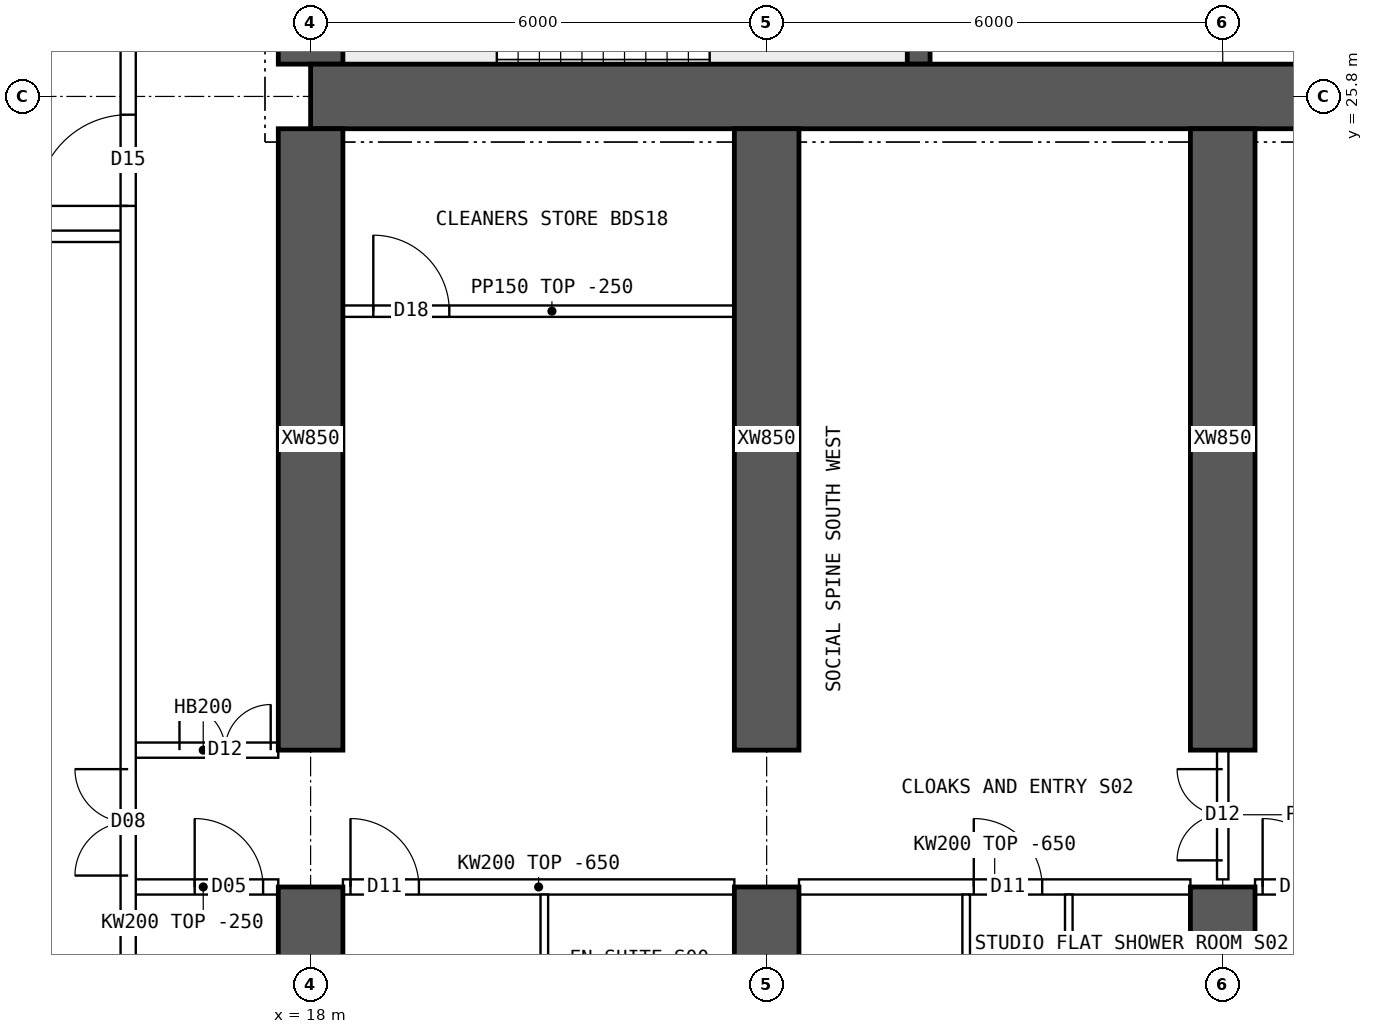
"""IFC4 building model, lengths in metres.
Left out: names, types, materials, properties, quantities, classifications, styles, units other than length and angle.
Written with IfcOpenShell. Run it as: python <this file> out.ifc"""

import sys

from ifc_helpers import new_model, si_unit, direction, frame, frame_2d, origin, place, context, subcontext, project, spatial, polyline, rectangle, outline, extrude, element, fill, save


model = new_model("IFC4")
c1 = context("Model", 3, precision=1e-05, world=origin(), true_north=direction((0.0, 1.0)))
c2 = subcontext(c1, "Body", "Model", "MODEL_VIEW")
j1 = project(units=[si_unit("LENGTHUNIT", "METRE"), si_unit("PLANEANGLEUNIT", "RADIAN")], contexts=[c1])
p1 = place(None, origin())
s1 = spatial("IfcSite", under=j1, at=p1, CompositionType="ELEMENT")
p2 = place(p1, origin())
s2 = spatial("IfcBuilding", under=s1, at=p2, CompositionType="ELEMENT")
p3 = place(p2, frame((0.0, 0.0, 171.1)))
s3 = spatial("IfcBuildingStorey", under=s2, at=p3, CompositionType="ELEMENT", Elevation=171.1)
p4 = place(p3, frame((18.0, 25.8, 0.0), z_axis=(0.0, 0.0, 1.0), x_axis=(1.0, 0.0, 0.0)))
e1 = element("IfcWall", 1, at=p4, inside=s3, PredefinedType="SHEAR", context=c2, shape_type="SweptSolid", body=[
    extrude(rectangle(XDim=48.0, YDim=0.85, at=frame_2d((24.0, 0.0))), origin(), (0.0, 0.0, 1.0), 3.75),
])
p5 = place(p3, frame((18.0, 26.225, 0.0), z_axis=(0.0, 0.0, 1.0), x_axis=(0.0, 1.0, 0.0)))
e2 = element("IfcWall", 2, at=p5, inside=s3, PredefinedType="SHEAR", context=c2, shape_type="SweptSolid", body=[
    extrude(rectangle(XDim=11.55, YDim=0.85, at=frame_2d((5.775, 0.0))), origin(), (0.0, 0.0, 1.0), 3.75),
])
p6 = place(p5, frame((5.075, 0.0, 0.0)))
e3 = element("IfcOpeningElement", 3, at=p6, cuts=e2, PredefinedType="OPENING", context=c2, shape_type="SweptSolid", body=[
    extrude(rectangle(XDim=1.2, YDim=2.1, at=frame_2d((0.6, 1.05))), frame((0.0, 0.435, 0.0), z_axis=(0.0, -1.0, 0.0), x_axis=(1.0, 0.0, 0.0)), (0.0, 0.0, 1.0), 0.87),
])
p7 = place(p3, frame((26.0, 26.225, 0.0), z_axis=(0.0, 0.0, 1.0), x_axis=(0.0, 1.0, 0.0)))
e4 = element("IfcWall", 4, at=p7, inside=s3, PredefinedType="SHEAR", context=c2, shape_type="SweptSolid", body=[
    extrude(rectangle(XDim=4.025, YDim=0.3, at=frame_2d((2.012, 0.0))), origin(), (0.0, 0.0, 1.0), 3.75),
])
p8 = place(p3, frame((18.0, 10.0, 0.0), z_axis=(0.0, 0.0, 1.0), x_axis=(0.0, 1.0, 0.0)))
e5 = element("IfcWall", 5, at=p8, inside=s3, PredefinedType="SHEAR", context=c2, shape_type="SweptSolid", body=[
    extrude(rectangle(XDim=5.4, YDim=0.85, at=frame_2d((2.7, 0.0))), origin(), (0.0, 0.0, 1.0), 3.75),
])
p9 = place(p3, frame((18.0, 17.2, 0.0), z_axis=(0.0, 0.0, 1.0), x_axis=(0.0, 1.0, 0.0)))
e6 = element("IfcWall", 6, at=p9, inside=s3, PredefinedType="SHEAR", context=c2, shape_type="SweptSolid", body=[
    extrude(rectangle(XDim=8.175, YDim=0.85, at=frame_2d((4.087, 0.0))), origin(), (0.0, 0.0, 1.0), 3.75),
])
p10 = place(p3, frame((24.0, 10.0, 0.0), z_axis=(0.0, 0.0, 1.0), x_axis=(0.0, 1.0, 0.0)))
e7 = element("IfcWall", 7, at=p10, inside=s3, PredefinedType="SHEAR", context=c2, shape_type="SweptSolid", body=[
    extrude(rectangle(XDim=5.4, YDim=0.85, at=frame_2d((2.7, 0.0))), origin(), (0.0, 0.0, 1.0), 3.75),
])
p11 = place(p3, frame((24.0, 17.2, 0.0), z_axis=(0.0, 0.0, 1.0), x_axis=(0.0, 1.0, 0.0)))
e8 = element("IfcWall", 8, at=p11, inside=s3, PredefinedType="SHEAR", context=c2, shape_type="SweptSolid", body=[
    extrude(rectangle(XDim=8.175, YDim=0.85, at=frame_2d((4.087, 0.0))), origin(), (0.0, 0.0, 1.0), 3.75),
])
p12 = place(p3, frame((30.0, 10.0, 0.0), z_axis=(0.0, 0.0, 1.0), x_axis=(0.0, 1.0, 0.0)))
e9 = element("IfcWall", 9, at=p12, inside=s3, PredefinedType="SHEAR", context=c2, shape_type="SweptSolid", body=[
    extrude(rectangle(XDim=5.4, YDim=0.85, at=frame_2d((2.7, 0.0))), origin(), (0.0, 0.0, 1.0), 3.75),
])
p13 = place(p3, frame((30.0, 17.2, 0.0), z_axis=(0.0, 0.0, 1.0), x_axis=(0.0, 1.0, 0.0)))
e10 = element("IfcWall", 10, at=p13, inside=s3, PredefinedType="SHEAR", context=c2, shape_type="SweptSolid", body=[
    extrude(rectangle(XDim=8.175, YDim=0.85, at=frame_2d((4.087, 0.0))), origin(), (0.0, 0.0, 1.0), 3.75),
])
p14 = place(p3, frame((15.6, 15.4, 0.0), z_axis=(0.0, 0.0, 1.0), x_axis=(1.0, 0.0, 0.0)))
e11 = element("IfcWall", 11, at=p14, inside=s3, PredefinedType="SOLIDWALL", context=c2, shape_type="SweptSolid", body=[
    extrude(rectangle(XDim=1.975, YDim=0.2, at=frame_2d((0.987, 0.0))), origin(), (0.0, 0.0, 1.0), 3.5),
])
p15 = place(p14, frame((0.875, 0.0, 0.0)))
e12 = element("IfcOpeningElement", 12, at=p15, cuts=e11, PredefinedType="OPENING", context=c2, shape_type="SweptSolid", body=[
    extrude(rectangle(XDim=0.9, YDim=2.1, at=frame_2d((0.45, 1.05))), frame((0.0, 0.11, 0.0), z_axis=(0.0, -1.0, 0.0), x_axis=(1.0, 0.0, 0.0)), (0.0, 0.0, 1.0), 0.22),
])
p16 = place(p3, frame((15.6, 17.2, 0.0), z_axis=(0.0, 0.0, 1.0), x_axis=(1.0, 0.0, 0.0)))
e13 = element("IfcWall", 13, at=p16, inside=s3, PredefinedType="SOLIDWALL", context=c2, shape_type="SweptSolid", body=[
    extrude(rectangle(XDim=1.975, YDim=0.2, at=frame_2d((0.987, 0.0))), origin(), (0.0, 0.0, 1.0), 3.5),
])
p17 = place(p16, frame((0.675, 0.0, 0.0)))
e14 = element("IfcOpeningElement", 14, at=p17, cuts=e13, PredefinedType="OPENING", context=c2, shape_type="SweptSolid", body=[
    extrude(rectangle(XDim=1.2, YDim=2.1, at=frame_2d((0.6, 1.05))), frame((0.0, 0.11, 0.0), z_axis=(0.0, -1.0, 0.0), x_axis=(1.0, 0.0, 0.0)), (0.0, 0.0, 1.0), 0.22),
])
p18 = place(p3, frame((18.425, 15.4, 0.0), z_axis=(0.0, 0.0, 1.0), x_axis=(1.0, 0.0, 0.0)))
e15 = element("IfcWall", 15, at=p18, inside=s3, PredefinedType="SOLIDWALL", context=c2, shape_type="SweptSolid", body=[
    extrude(outline(polyline([(0.0, 0.0), (5.15, 0.0), (5.15, 3.1), (0.0, 3.1), (0.0, 0.0)])), frame((0.0, 0.1, 0.0), z_axis=(0.0, -1.0, 0.0), x_axis=(1.0, 0.0, 0.0)), (0.0, 0.0, 1.0), 0.2),
])
p19 = place(p18, frame((0.1, 0.0, 0.0)))
e16 = element("IfcOpeningElement", 16, at=p19, cuts=e15, PredefinedType="OPENING", context=c2, shape_type="SweptSolid", body=[
    extrude(rectangle(XDim=0.9, YDim=2.1, at=frame_2d((0.45, 1.05))), frame((0.0, 0.11, 0.0), z_axis=(0.0, -1.0, 0.0), x_axis=(1.0, 0.0, 0.0)), (0.0, 0.0, 1.0), 0.22),
])
p20 = place(p3, frame((24.425, 15.4, 0.0), z_axis=(0.0, 0.0, 1.0), x_axis=(1.0, 0.0, 0.0)))
e17 = element("IfcWall", 17, at=p20, inside=s3, PredefinedType="SOLIDWALL", context=c2, shape_type="SweptSolid", body=[
    extrude(outline(polyline([(0.0, 0.0), (5.15, 0.0), (5.15, 3.1), (0.0, 3.1), (0.0, 0.0)])), frame((0.0, 0.1, 0.0), z_axis=(0.0, -1.0, 0.0), x_axis=(1.0, 0.0, 0.0)), (0.0, 0.0, 1.0), 0.2),
])
p21 = place(p20, frame((2.3, 0.0, 0.0)))
e18 = element("IfcOpeningElement", 18, at=p21, cuts=e17, PredefinedType="OPENING", context=c2, shape_type="SweptSolid", body=[
    extrude(rectangle(XDim=0.9, YDim=2.1, at=frame_2d((0.45, 1.05))), frame((0.0, 0.11, 0.0), z_axis=(0.0, -1.0, 0.0), x_axis=(1.0, 0.0, 0.0)), (0.0, 0.0, 1.0), 0.22),
])
p22 = place(p3, frame((30.425, 15.4, 0.0), z_axis=(0.0, 0.0, 1.0), x_axis=(1.0, 0.0, 0.0)))
e19 = element("IfcWall", 19, at=p22, inside=s3, PredefinedType="SOLIDWALL", context=c2, shape_type="SweptSolid", body=[
    extrude(outline(polyline([(0.0, 0.0), (5.15, 0.0), (5.15, 3.1), (0.0, 3.1), (0.0, 0.0)])), frame((0.0, 0.1, 0.0), z_axis=(0.0, -1.0, 0.0), x_axis=(1.0, 0.0, 0.0)), (0.0, 0.0, 1.0), 0.2),
])
p23 = place(p22, frame((0.1, 0.0, 0.0)))
e20 = element("IfcOpeningElement", 20, at=p23, cuts=e19, PredefinedType="OPENING", context=c2, shape_type="SweptSolid", body=[
    extrude(rectangle(XDim=0.9, YDim=2.1, at=frame_2d((0.45, 1.05))), frame((0.0, 0.11, 0.0), z_axis=(0.0, -1.0, 0.0), x_axis=(1.0, 0.0, 0.0)), (0.0, 0.0, 1.0), 0.22),
])
p24 = place(p3, frame((21.075, 12.55, 0.0), z_axis=(0.0, 0.0, 1.0), x_axis=(0.0, 1.0, 0.0)))
e21 = element("IfcWall", 21, at=p24, inside=s3, PredefinedType="PARTITIONING", context=c2, shape_type="SweptSolid", body=[
    extrude(outline(polyline([(0.0, 0.0), (2.75, 0.0), (2.75, 3.1), (2.702, 3.1), (2.7, 3.5), (0.0, 3.5), (0.0, 0.0)])), frame((0.0, 0.05, 0.0), z_axis=(0.0, -1.0, 0.0), x_axis=(1.0, 0.0, 0.0)), (0.0, 0.0, 1.0), 0.1),
])
p25 = place(p3, frame((26.625, 12.95, 0.0), z_axis=(0.0, 0.0, 1.0), x_axis=(0.0, 1.0, 0.0)))
e22 = element("IfcWall", 22, at=p25, inside=s3, PredefinedType="PARTITIONING", context=c2, shape_type="SweptSolid", body=[
    extrude(outline(polyline([(0.0, 0.0), (2.35, 0.0), (2.35, 3.1), (2.302, 3.1), (2.3, 3.5), (0.0, 3.5), (0.0, 0.0)])), frame((0.0, 0.05, 0.0), z_axis=(0.0, -1.0, 0.0), x_axis=(1.0, 0.0, 0.0)), (0.0, 0.0, 1.0), 0.1),
])
p26 = place(p3, frame((27.975, 12.95, 0.0), z_axis=(0.0, 0.0, 1.0), x_axis=(0.0, 1.0, 0.0)))
e23 = element("IfcWall", 23, at=p26, inside=s3, PredefinedType="PARTITIONING", context=c2, shape_type="SweptSolid", body=[
    extrude(outline(polyline([(0.0, 0.0), (2.35, 0.0), (2.35, 3.1), (2.302, 3.1), (2.3, 3.5), (0.0, 3.5), (0.0, 0.0)])), frame((0.0, 0.05, 0.0), z_axis=(0.0, -1.0, 0.0), x_axis=(1.0, 0.0, 0.0)), (0.0, 0.0, 1.0), 0.1),
])
p27 = place(p26, frame((0.8, 0.0, 0.0)))
e24 = element("IfcOpeningElement", 24, at=p27, cuts=e23, PredefinedType="OPENING", context=c2, shape_type="SweptSolid", body=[
    extrude(rectangle(XDim=0.8, YDim=2.1, at=frame_2d((0.4, 1.05))), frame((0.0, 0.06, 0.0), z_axis=(0.0, -1.0, 0.0), x_axis=(1.0, 0.0, 0.0)), (0.0, 0.0, 1.0), 0.12),
])
p28 = place(p3, frame((18.425, 22.975, 0.0), z_axis=(0.0, 0.0, 1.0), x_axis=(1.0, 0.0, 0.0)))
e25 = element("IfcWall", 25, at=p28, inside=s3, PredefinedType="PARTITIONING", context=c2, shape_type="SweptSolid", body=[
    extrude(rectangle(XDim=5.5, YDim=0.15, at=frame_2d((2.75, 0.0))), origin(), (0.0, 0.0, 1.0), 3.5),
])
p29 = place(p28, frame((0.4, 0.0, 0.0)))
e26 = element("IfcOpeningElement", 26, at=p29, cuts=e25, PredefinedType="OPENING", context=c2, shape_type="SweptSolid", body=[
    extrude(rectangle(XDim=1.0, YDim=2.1, at=frame_2d((0.5, 1.05))), frame((0.0, 0.085, 0.0), z_axis=(0.0, -1.0, 0.0), x_axis=(1.0, 0.0, 0.0)), (0.0, 0.0, 1.0), 0.17),
])
p30 = place(p3, frame((30.0, 15.5, 0.0), z_axis=(0.0, 0.0, 1.0), x_axis=(0.0, 1.0, 0.0)))
e27 = element("IfcWall", 27, at=p30, inside=s3, PredefinedType="PARTITIONING", context=c2, shape_type="SweptSolid", body=[
    extrude(outline(polyline([(0.0, 0.0), (1.7, 0.0), (1.7, 3.1), (0.0, 3.1), (0.0, 0.0)])), frame((0.0, 0.075, 0.0), z_axis=(0.0, -1.0, 0.0), x_axis=(1.0, 0.0, 0.0)), (0.0, 0.0, 1.0), 0.15),
])
p31 = place(p30, frame((0.25, 0.0, 0.0)))
e28 = element("IfcOpeningElement", 28, at=p31, cuts=e27, PredefinedType="OPENING", context=c2, shape_type="SweptSolid", body=[
    extrude(rectangle(XDim=1.2, YDim=2.1, at=frame_2d((0.6, 1.05))), frame((0.0, 0.085, 0.0), z_axis=(0.0, -1.0, 0.0), x_axis=(1.0, 0.0, 0.0)), (0.0, 0.0, 1.0), 0.17),
])
p32 = place(p3, frame((15.6, 10.446, 0.0), z_axis=(0.0, 0.0, 1.0), x_axis=(0.0, 1.0, 0.0)))
e29 = element("IfcWall", 29, at=p32, inside=s3, PredefinedType="SOLIDWALL", context=c2, shape_type="SweptSolid", body=[
    extrude(rectangle(XDim=43.107, YDim=0.2, at=frame_2d((21.554, 0.0))), origin(), (0.0, 0.0, 1.0), 3.5),
])
p33 = place(p32, frame((13.914, 0.0, 0.0)))
e30 = element("IfcOpeningElement", 30, at=p33, cuts=e29, PredefinedType="OPENING", context=c2, shape_type="SweptSolid", body=[
    extrude(rectangle(XDim=1.2, YDim=2.1, at=frame_2d((0.6, 1.05))), frame((0.0, 0.11, 0.0), z_axis=(0.0, -1.0, 0.0), x_axis=(1.0, 0.0, 0.0)), (0.0, 0.0, 1.0), 0.22),
])
p34 = place(p32, frame((27.994, 0.0, 0.0)))
e31 = element("IfcOpeningElement", 31, at=p34, cuts=e29, PredefinedType="OPENING", context=c2, shape_type="SweptSolid", body=[
    extrude(rectangle(XDim=1.2, YDim=2.1, at=frame_2d((0.6, 1.05))), frame((0.0, 0.11, 0.0), z_axis=(0.0, -1.0, 0.0), x_axis=(1.0, 0.0, 0.0)), (0.0, 0.0, 1.0), 0.22),
])
p35 = place(p32, frame((5.104, 0.0, 0.0)))
e32 = element("IfcOpeningElement", 32, at=p35, cuts=e29, PredefinedType="OPENING", context=c2, shape_type="SweptSolid", body=[
    extrude(rectangle(XDim=1.4, YDim=2.1, at=frame_2d((0.7, 1.05))), frame((0.0, 0.11, 0.0), z_axis=(0.0, -1.0, 0.0), x_axis=(1.0, 0.0, 0.0)), (0.0, 0.0, 1.0), 0.22),
])
p36 = place(p32, frame((36.504, 0.0, 0.0)))
e33 = element("IfcOpeningElement", 33, at=p36, cuts=e29, PredefinedType="OPENING", context=c2, shape_type="SweptSolid", body=[
    extrude(rectangle(XDim=1.4, YDim=2.1, at=frame_2d((0.7, 1.05))), frame((0.0, 0.11, 0.0), z_axis=(0.0, -1.0, 0.0), x_axis=(1.0, 0.0, 0.0)), (0.0, 0.0, 1.0), 0.22),
])
p37 = place(p3, frame((8.705, 23.96, 0.0), z_axis=(0.0, 0.0, 1.0), x_axis=(1.0, 0.0, 0.0)))
e34 = element("IfcWall", 34, at=p37, inside=s3, PredefinedType="PARTITIONING", context=c2, shape_type="SweptSolid", body=[
    extrude(rectangle(XDim=6.82, YDim=0.15, at=frame_2d((3.41, 0.0))), origin(), (0.0, 0.0, 1.0), 3.5),
])
p38 = place(p17, origin())
e35 = element("IfcDoor", 35, at=p38, inside=s3, OperationType="DOUBLE_DOOR_SINGLE_SWING", PredefinedType="DOOR", context=c2, shape_type="SweptSolid", body=[
    extrude(rectangle(XDim=1.2, YDim=2.1, at=frame_2d((0.6, 1.05))), frame((0.0, 0.025, 0.0), z_axis=(0.0, -1.0, 0.0), x_axis=(1.0, 0.0, 0.0)), (0.0, 0.0, 1.0), 0.05),
])
fill(e14, e35)
p39 = place(p19, origin())
e36 = element("IfcDoor", 36, at=p39, inside=s3, OperationType="SINGLE_SWING_LEFT", PredefinedType="DOOR", context=c2, shape_type="SweptSolid", body=[
    extrude(rectangle(XDim=0.9, YDim=2.1, at=frame_2d((0.45, 1.05))), frame((0.0, 0.025, 0.0), z_axis=(0.0, -1.0, 0.0), x_axis=(1.0, 0.0, 0.0)), (0.0, 0.0, 1.0), 0.05),
])
fill(e16, e36)
p40 = place(p27, origin())
e37 = element("IfcDoor", 37, at=p40, inside=s3, OperationType="SINGLE_SWING_RIGHT", PredefinedType="DOOR", context=c2, shape_type="SweptSolid", body=[
    extrude(rectangle(XDim=0.8, YDim=2.1, at=frame_2d((0.4, 1.05))), frame((0.0, 0.025, 0.0), z_axis=(0.0, -1.0, 0.0), x_axis=(1.0, 0.0, 0.0)), (0.0, 0.0, 1.0), 0.05),
])
fill(e24, e37)
p41 = place(p21, origin())
e38 = element("IfcDoor", 38, at=p41, inside=s3, OperationType="SINGLE_SWING_LEFT", PredefinedType="DOOR", context=c2, shape_type="SweptSolid", body=[
    extrude(rectangle(XDim=0.9, YDim=2.1, at=frame_2d((0.45, 1.05))), frame((0.0, 0.025, 0.0), z_axis=(0.0, -1.0, 0.0), x_axis=(1.0, 0.0, 0.0)), (0.0, 0.0, 1.0), 0.05),
])
fill(e18, e38)
p42 = place(p23, origin())
e39 = element("IfcDoor", 39, at=p42, inside=s3, OperationType="SINGLE_SWING_LEFT", PredefinedType="DOOR", context=c2, shape_type="SweptSolid", body=[
    extrude(rectangle(XDim=0.9, YDim=2.1, at=frame_2d((0.45, 1.05))), frame((0.0, 0.025, 0.0), z_axis=(0.0, -1.0, 0.0), x_axis=(1.0, 0.0, 0.0)), (0.0, 0.0, 1.0), 0.05),
])
fill(e20, e39)
p43 = place(p29, origin())
e40 = element("IfcDoor", 40, at=p43, inside=s3, OperationType="SINGLE_SWING_LEFT", PredefinedType="DOOR", context=c2, shape_type="SweptSolid", body=[
    extrude(rectangle(XDim=1.0, YDim=2.1, at=frame_2d((0.5, 1.05))), frame((0.0, 0.025, 0.0), z_axis=(0.0, -1.0, 0.0), x_axis=(1.0, 0.0, 0.0)), (0.0, 0.0, 1.0), 0.05),
])
fill(e26, e40)
p44 = place(p31, origin())
e41 = element("IfcDoor", 41, at=p44, inside=s3, OperationType="DOUBLE_DOOR_SINGLE_SWING", PredefinedType="DOOR", context=c2, shape_type="SweptSolid", body=[
    extrude(rectangle(XDim=1.2, YDim=2.1, at=frame_2d((0.6, 1.05))), frame((0.0, 0.025, 0.0), z_axis=(0.0, -1.0, 0.0), x_axis=(1.0, 0.0, 0.0)), (0.0, 0.0, 1.0), 0.05),
])
fill(e28, e41)
p45 = place(p33, origin())
e42 = element("IfcDoor", 42, at=p45, inside=s3, OperationType="SINGLE_SWING_LEFT", PredefinedType="DOOR", context=c2, shape_type="SweptSolid", body=[
    extrude(rectangle(XDim=1.2, YDim=2.1, at=frame_2d((0.6, 1.05))), frame((0.0, 0.025, 0.0), z_axis=(0.0, -1.0, 0.0), x_axis=(1.0, 0.0, 0.0)), (0.0, 0.0, 1.0), 0.05),
])
fill(e30, e42)
p46 = place(p35, origin())
e43 = element("IfcDoor", 43, at=p46, inside=s3, OperationType="DOUBLE_DOOR_SINGLE_SWING", PredefinedType="DOOR", context=c2, shape_type="SweptSolid", body=[
    extrude(rectangle(XDim=1.4, YDim=2.1, at=frame_2d((0.7, 1.05))), frame((0.0, 0.025, 0.0), z_axis=(0.0, -1.0, 0.0), x_axis=(1.0, 0.0, 0.0)), (0.0, 0.0, 1.0), 0.05),
])
fill(e32, e43)
p47 = place(p15, origin())
e44 = element("IfcDoor", 44, at=p47, inside=s3, OperationType="SINGLE_SWING_LEFT", PredefinedType="DOOR", context=c2, shape_type="SweptSolid", body=[
    extrude(rectangle(XDim=0.9, YDim=2.1, at=frame_2d((0.45, 1.05))), frame((0.0, 0.025, 0.0), z_axis=(0.0, -1.0, 0.0), x_axis=(1.0, 0.0, 0.0)), (0.0, 0.0, 1.0), 0.05),
])
fill(e12, e44)
save(model, sys.argv[1])
